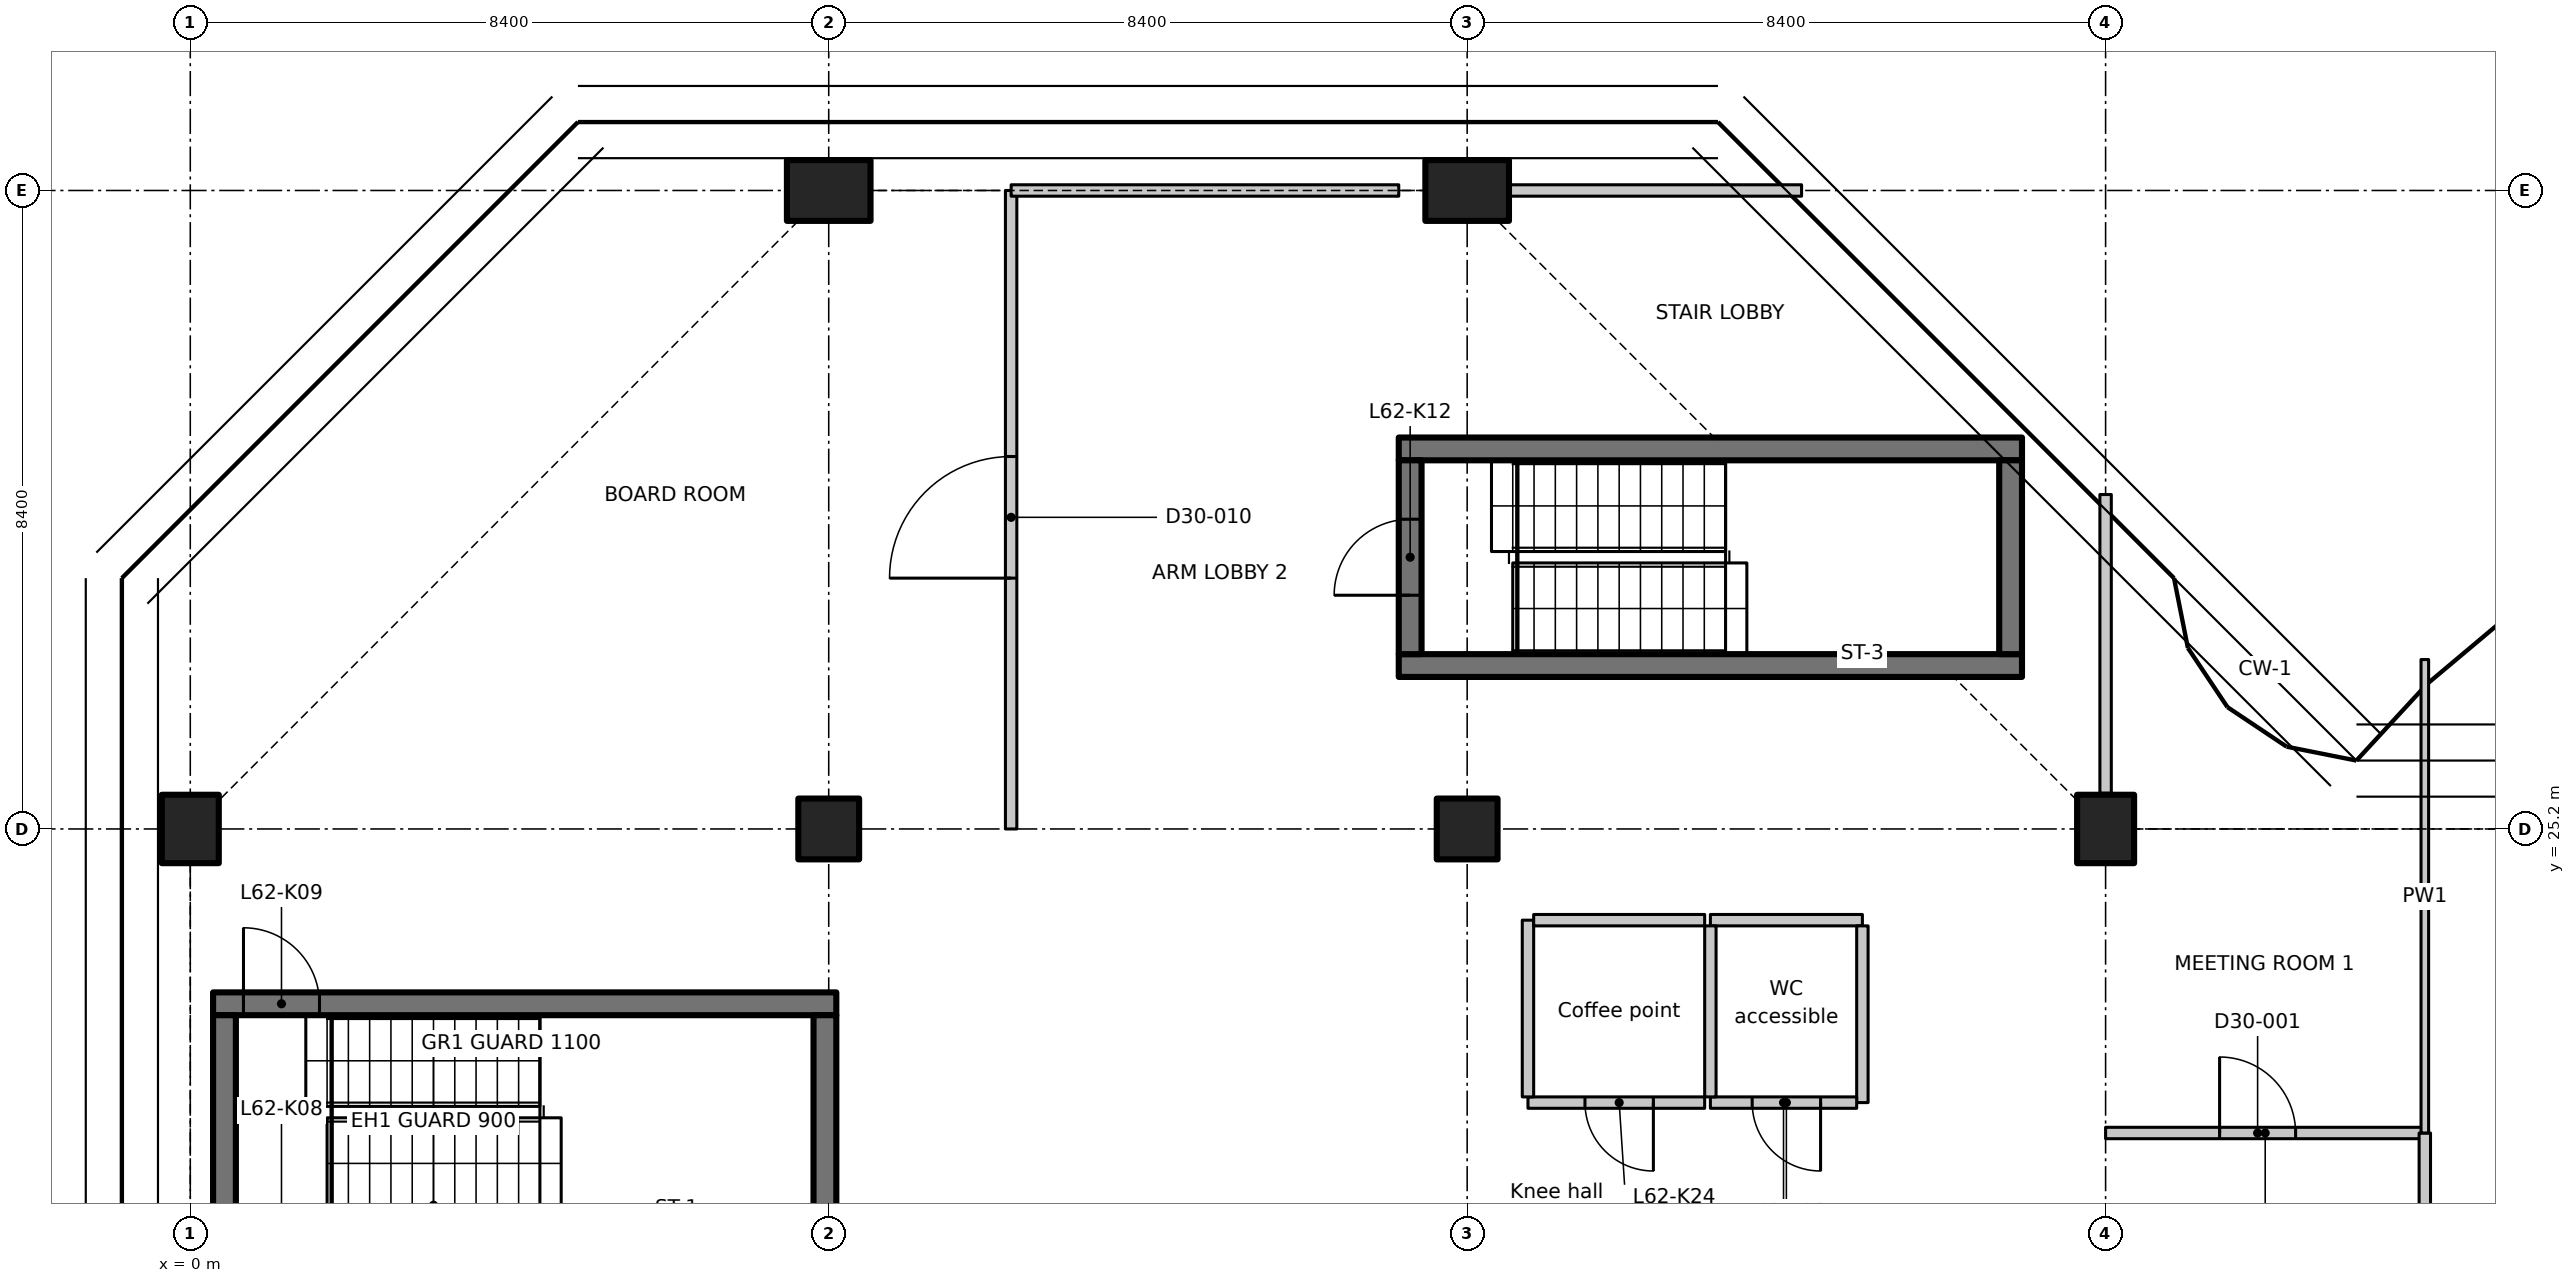
"""IFC4 building model, lengths in metres.
Left out: names, types, materials, properties, quantities, classifications, styles, units other than length and angle.
Written with IfcOpenShell. Run it as: python <this file> out.ifc"""

import sys

from ifc_helpers import new_model, si_unit, direction, frame, frame_2d, origin, origin_2d, place, context, subcontext, project, spatial, polyline, rectangle, outline, extrude, element, fill, save


model = new_model("IFC4")
c1 = context("Model", 3, precision=1e-05, world=origin(), true_north=direction((0.0, 1.0)))
c2 = subcontext(c1, "Body", "Model", "MODEL_VIEW")
j1 = project(units=[si_unit("LENGTHUNIT", "METRE"), si_unit("PLANEANGLEUNIT", "RADIAN")], contexts=[c1])
p1 = place(None, origin())
s1 = spatial("IfcSite", under=j1, at=p1, CompositionType="ELEMENT")
p2 = place(p1, origin())
s2 = spatial("IfcBuilding", under=s1, at=p2, CompositionType="ELEMENT")
p3 = place(p2, frame((0.0, 0.0, 244.5)))
s3 = spatial("IfcBuildingStorey", under=s2, at=p3, CompositionType="ELEMENT", Elevation=244.5)
p4 = place(p3, frame((0.0, 25.2, 0.0), z_axis=(0.0, 0.0, 1.0), x_axis=(1.0, 0.0, 0.0)))
e1 = element("IfcColumn", 1, at=p4, inside=s3, PredefinedType="COLUMN", context=c2, shape_type="SweptSolid", body=[
    extrude(rectangle(XDim=0.75, YDim=0.9, at=origin_2d()), origin(), (0.0, 0.0, 1.0), 3.35),
])
p5 = place(p3, frame((8.4, 25.2, 0.0), z_axis=(0.0, 0.0, 1.0), x_axis=(1.0, 0.0, 0.0)))
e2 = element("IfcColumn", 2, at=p5, inside=s3, PredefinedType="COLUMN", context=c2, shape_type="SweptSolid", body=[
    extrude(rectangle(XDim=0.8, YDim=0.8, at=origin_2d()), origin(), (0.0, 0.0, 1.0), 3.35),
])
p6 = place(p3, frame((8.4, 33.6, 0.0), z_axis=(0.0, 0.0, 1.0), x_axis=(0.0, 1.0, 0.0)))
e3 = element("IfcColumn", 3, at=p6, inside=s3, PredefinedType="COLUMN", context=c2, shape_type="SweptSolid", body=[
    extrude(rectangle(XDim=0.8, YDim=1.1, at=origin_2d()), origin(), (0.0, 0.0, 1.0), 3.35),
])
p7 = place(p3, frame((16.8, 25.2, 0.0), z_axis=(0.0, 0.0, 1.0), x_axis=(1.0, 0.0, 0.0)))
e4 = element("IfcColumn", 4, at=p7, inside=s3, PredefinedType="COLUMN", context=c2, shape_type="SweptSolid", body=[
    extrude(rectangle(XDim=0.8, YDim=0.8, at=origin_2d()), origin(), (0.0, 0.0, 1.0), 3.35),
])
p8 = place(p3, frame((16.8, 33.6, 0.0), z_axis=(0.0, 0.0, 1.0), x_axis=(0.0, 1.0, 0.0)))
e5 = element("IfcColumn", 5, at=p8, inside=s3, PredefinedType="COLUMN", context=c2, shape_type="SweptSolid", body=[
    extrude(rectangle(XDim=0.8, YDim=1.1, at=origin_2d()), origin(), (0.0, 0.0, 1.0), 3.35),
])
p9 = place(p3, frame((25.2, 25.2, 0.0), z_axis=(0.0, 0.0, 1.0), x_axis=(1.0, 0.0, 0.0)))
e6 = element("IfcColumn", 6, at=p9, inside=s3, PredefinedType="COLUMN", context=c2, shape_type="SweptSolid", body=[
    extrude(rectangle(XDim=0.75, YDim=0.9, at=origin_2d()), origin(), (0.0, 0.0, 1.0), 3.35),
])
p10 = place(p3, frame((0.3, 22.9, 0.0), z_axis=(0.0, 0.0, 1.0), x_axis=(1.0, 0.0, 0.0)))
e7 = element("IfcWall", 7, at=p10, inside=s3, PredefinedType="SHEAR", context=c2, shape_type="SweptSolid", body=[
    extrude(rectangle(XDim=8.2, YDim=0.3, at=frame_2d((4.1, 0.0))), origin(), (0.0, 0.0, 1.0), 3.35),
])
p11 = place(p10, frame((0.4, 0.0, 0.0)))
e8 = element("IfcOpeningElement", 8, at=p11, cuts=e7, PredefinedType="OPENING", context=c2, shape_type="SweptSolid", body=[
    extrude(rectangle(XDim=1.0, YDim=2.1, at=frame_2d((0.5, 1.05))), frame((0.0, 0.16, 0.0), z_axis=(0.0, -1.0, 0.0), x_axis=(1.0, 0.0, 0.0)), (0.0, 0.0, 1.0), 0.32),
])
for number, where, z_axis, x_axis in (
    (9, (0.45, 20.2, 0.0), (0.0, 0.0, 1.0), (0.0, 1.0, 0.0)),
    (10, (8.35, 20.2, 0.0), (0.0, 0.0, 1.0), (0.0, 1.0, 0.0)),
):
    element("IfcWall", number, at=place(p3, frame(where, z_axis=z_axis, x_axis=x_axis)), inside=s3, PredefinedType="SHEAR", context=c2, shape_type="SweptSolid", body=[
        extrude(rectangle(XDim=2.55, YDim=0.3, at=frame_2d((1.275, 0.0))), origin(), (0.0, 0.0, 1.0), 3.35),
    ])
for number, where, z_axis, x_axis in (
    (11, (15.9, 27.35, 0.0), (0.0, 0.0, 1.0), (1.0, 0.0, 0.0)),
    (12, (15.9, 30.2, 0.0), (0.0, 0.0, 1.0), (1.0, 0.0, 0.0)),
):
    element("IfcWall", number, at=place(p3, frame(where, z_axis=z_axis, x_axis=x_axis)), inside=s3, PredefinedType="SHEAR", context=c2, shape_type="SweptSolid", body=[
        extrude(rectangle(XDim=8.2, YDim=0.3, at=frame_2d((4.1, 0.0))), origin(), (0.0, 0.0, 1.0), 3.35),
    ])
p12 = place(p3, frame((16.05, 27.5, 0.0), z_axis=(0.0, 0.0, 1.0), x_axis=(0.0, 1.0, 0.0)))
e13 = element("IfcWall", 13, at=p12, inside=s3, PredefinedType="SHEAR", context=c2, shape_type="SweptSolid", body=[
    extrude(rectangle(XDim=2.55, YDim=0.3, at=frame_2d((1.275, 0.0))), origin(), (0.0, 0.0, 1.0), 3.35),
])
p13 = place(p12, frame((0.775, 0.0, 0.0)))
e14 = element("IfcOpeningElement", 14, at=p13, cuts=e13, PredefinedType="OPENING", context=c2, shape_type="SweptSolid", body=[
    extrude(rectangle(XDim=1.0, YDim=2.1, at=frame_2d((0.5, 1.05))), frame((0.0, 0.16, 0.0), z_axis=(0.0, -1.0, 0.0), x_axis=(1.0, 0.0, 0.0)), (0.0, 0.0, 1.0), 0.32),
])
p14 = place(p3, frame((23.95, 27.5, 0.0), z_axis=(0.0, 0.0, 1.0), x_axis=(0.0, 1.0, 0.0)))
e15 = element("IfcWall", 15, at=p14, inside=s3, PredefinedType="SHEAR", context=c2, shape_type="SweptSolid", body=[
    extrude(rectangle(XDim=2.55, YDim=0.3, at=frame_2d((1.275, 0.0))), origin(), (0.0, 0.0, 1.0), 3.35),
])
p15 = place(p3, frame((20.0, 24.0, 0.0), z_axis=(0.0, 0.0, 1.0), x_axis=(1.0, 0.0, 0.0)))
e16 = element("IfcWall", 16, at=p15, inside=s3, PredefinedType="PARTITIONING", context=c2, shape_type="SweptSolid", body=[
    extrude(rectangle(XDim=2.0, YDim=0.15, at=frame_2d((1.0, 0.0))), origin(), (0.0, 0.0, 1.0), 3.35),
])
p16 = place(p3, frame((22.0, 23.925, 0.0), z_axis=(0.0, 0.0, 1.0), x_axis=(0.0, -1.0, 0.0)))
e17 = element("IfcWall", 17, at=p16, inside=s3, PredefinedType="PARTITIONING", context=c2, shape_type="SweptSolid", body=[
    extrude(rectangle(XDim=2.325, YDim=0.15, at=frame_2d((1.163, 0.0))), origin(), (0.0, 0.0, 1.0), 3.35),
])
p17 = place(p3, frame((21.925, 21.6, 0.0), z_axis=(0.0, 0.0, 1.0), x_axis=(-1.0, 0.0, 0.0)))
e18 = element("IfcWall", 18, at=p17, inside=s3, PredefinedType="PARTITIONING", context=c2, shape_type="SweptSolid", body=[
    extrude(rectangle(XDim=1.925, YDim=0.15, at=frame_2d((0.962, 0.0))), origin(), (0.0, 0.0, 1.0), 3.35),
])
p18 = place(p17, frame((0.475, 0.0, 0.0)))
e19 = element("IfcOpeningElement", 19, at=p18, cuts=e18, PredefinedType="OPENING", context=c2, shape_type="SweptSolid", body=[
    extrude(rectangle(XDim=0.9, YDim=2.1, at=frame_2d((0.45, 1.05))), frame((0.0, 0.085, 0.0), z_axis=(0.0, -1.0, 0.0), x_axis=(1.0, 0.0, 0.0)), (0.0, 0.0, 1.0), 0.17),
])
p19 = place(p3, frame((20.0, 21.675, 0.0), z_axis=(0.0, 0.0, 1.0), x_axis=(0.0, 1.0, 0.0)))
e20 = element("IfcWall", 20, at=p19, inside=s3, PredefinedType="PARTITIONING", context=c2, shape_type="SweptSolid", body=[
    extrude(rectangle(XDim=2.25, YDim=0.15, at=frame_2d((1.125, 0.0))), origin(), (0.0, 0.0, 1.0), 3.35),
])
p20 = place(p3, frame((19.925, 21.6, 0.0), z_axis=(0.0, 0.0, 1.0), x_axis=(-1.0, 0.0, 0.0)))
e21 = element("IfcWall", 21, at=p20, inside=s3, PredefinedType="PARTITIONING", context=c2, shape_type="SweptSolid", body=[
    extrude(rectangle(XDim=2.325, YDim=0.15, at=frame_2d((1.163, 0.0))), origin(), (0.0, 0.0, 1.0), 3.35),
])
p21 = place(p20, frame((0.675, 0.0, 0.0)))
e22 = element("IfcOpeningElement", 22, at=p21, cuts=e21, PredefinedType="OPENING", context=c2, shape_type="SweptSolid", body=[
    extrude(rectangle(XDim=0.9, YDim=2.1, at=frame_2d((0.45, 1.05))), frame((0.0, 0.085, 0.0), z_axis=(0.0, -1.0, 0.0), x_axis=(1.0, 0.0, 0.0)), (0.0, 0.0, 1.0), 0.17),
])
p22 = place(p3, frame((17.6, 21.675, 0.0), z_axis=(0.0, 0.0, 1.0), x_axis=(0.0, 1.0, 0.0)))
e23 = element("IfcWall", 23, at=p22, inside=s3, PredefinedType="PARTITIONING", context=c2, shape_type="SweptSolid", body=[
    extrude(rectangle(XDim=2.325, YDim=0.15, at=frame_2d((1.163, 0.0))), origin(), (0.0, 0.0, 1.0), 3.35),
])
p23 = place(p3, frame((17.675, 24.0, 0.0), z_axis=(0.0, 0.0, 1.0), x_axis=(1.0, 0.0, 0.0)))
e24 = element("IfcWall", 24, at=p23, inside=s3, PredefinedType="PARTITIONING", context=c2, shape_type="SweptSolid", body=[
    extrude(rectangle(XDim=2.25, YDim=0.15, at=frame_2d((1.125, 0.0))), origin(), (0.0, 0.0, 1.0), 3.35),
])
p24 = place(p3, frame((25.2, 21.2, 0.0), z_axis=(0.0, 0.0, 1.0), x_axis=(1.0, 0.0, 0.0)))
e25 = element("IfcWall", 25, at=p24, inside=s3, PredefinedType="PARTITIONING", context=c2, shape_type="SweptSolid", body=[
    extrude(rectangle(XDim=4.2, YDim=0.15, at=frame_2d((2.1, 0.0))), origin(), (0.0, 0.0, 1.0), 3.33),
])
p25 = place(p24, frame((1.5, 0.0, 0.0)))
e26 = element("IfcOpeningElement", 26, at=p25, cuts=e25, PredefinedType="OPENING", context=c2, shape_type="SweptSolid", body=[
    extrude(rectangle(XDim=1.0, YDim=2.1, at=frame_2d((0.5, 1.05))), frame((0.0, 0.085, 0.0), z_axis=(0.0, -1.0, 0.0), x_axis=(1.0, 0.0, 0.0)), (0.0, 0.0, 1.0), 0.17),
])
p26 = place(p3, frame((29.4, 21.2, 0.0), z_axis=(0.0, 0.0, 1.0), x_axis=(0.0, -1.0, 0.0)))
e27 = element("IfcWall", 27, at=p26, inside=s3, PredefinedType="PARTITIONING", context=c2, shape_type="SweptSolid", body=[
    extrude(rectangle(XDim=8.2, YDim=0.15, at=frame_2d((4.1, 0.0))), origin(), (0.0, 0.0, 1.0), 3.33),
])
p27 = place(p26, frame((3.3, 0.0, 0.0)))
e28 = element("IfcOpeningElement", 28, at=p27, cuts=e27, PredefinedType="OPENING", context=c2, shape_type="SweptSolid", body=[
    extrude(rectangle(XDim=1.6, YDim=2.1, at=frame_2d((0.8, 1.05))), frame((0.0, 0.085, 0.0), z_axis=(0.0, -1.0, 0.0), x_axis=(1.0, 0.0, 0.0)), (0.0, 0.0, 1.0), 0.17),
])
p28 = place(p3, frame((29.4, 27.429, 0.0), z_axis=(0.0, 0.0, 1.0), x_axis=(0.0, -1.0, 0.0)))
e29 = element("IfcWall", 29, at=p28, inside=s3, PredefinedType="PARTITIONING", context=c2, shape_type="SweptSolid", body=[
    extrude(outline(polyline([(0.0, 0.0), (6.229, 0.0), (6.229, 3.33), (2.679, 3.33), (2.677, 2.98), (1.781, 2.98), (1.779, 3.33), (0.154, 3.33), (0.0, 3.33), (0.0, 0.0)])), frame((0.0, 0.05, 0.0), z_axis=(0.0, -1.0, 0.0), x_axis=(1.0, 0.0, 0.0)), (0.0, 0.0, 1.0), 0.1),
])
p29 = place(p3, frame((25.2, 25.67, 0.0), z_axis=(0.0, 0.0, 1.0), x_axis=(0.0, 1.0, 0.0)))
e30 = element("IfcWall", 30, at=p29, inside=s3, PredefinedType="PARTITIONING", context=c2, shape_type="SweptSolid", body=[
    extrude(rectangle(XDim=3.93, YDim=0.15, at=frame_2d((1.965, 0.0))), origin(), (0.0, 0.0, 1.0), 2.98),
])
p30 = place(p3, frame((10.8, 25.2, 0.0), z_axis=(0.0, 0.0, 1.0), x_axis=(0.0, 1.0, 0.0)))
e31 = element("IfcWall", 31, at=p30, inside=s3, PredefinedType="PARTITIONING", context=c2, shape_type="SweptSolid", body=[
    extrude(outline(polyline([(0.0, 0.0), (8.4, 0.0), (8.4, 2.98), (7.952, 2.98), (7.95, 3.33), (0.0, 3.33), (0.0, 0.0)])), frame((0.0, 0.075, 0.0), z_axis=(0.0, -1.0, 0.0), x_axis=(1.0, 0.0, 0.0)), (0.0, 0.0, 1.0), 0.15),
])
p31 = place(p30, frame((3.3, 0.0, 0.0)))
e32 = element("IfcOpeningElement", 32, at=p31, cuts=e31, PredefinedType="OPENING", context=c2, shape_type="SweptSolid", body=[
    extrude(rectangle(XDim=1.6, YDim=2.1, at=frame_2d((0.8, 1.05))), frame((0.0, 0.085, 0.0), z_axis=(0.0, -1.0, 0.0), x_axis=(1.0, 0.0, 0.0)), (0.0, 0.0, 1.0), 0.17),
])
p32 = place(p3, frame((10.8, 33.6, 0.0), z_axis=(0.0, 0.0, 1.0), x_axis=(1.0, 0.0, 0.0)))
e33 = element("IfcWall", 33, at=p32, inside=s3, PredefinedType="PARTITIONING", context=c2, shape_type="SweptSolid", body=[
    extrude(outline(polyline([(0.0, 0.0), (5.1, 0.0), (5.1, 2.98), (0.0, 2.98), (0.0, 0.0)])), frame((0.0, 0.075, 0.0), z_axis=(0.0, -1.0, 0.0), x_axis=(1.0, 0.0, 0.0)), (0.0, 0.0, 1.0), 0.15),
])
p33 = place(p3, frame((17.37, 33.6, 0.0), z_axis=(0.0, 0.0, 1.0), x_axis=(1.0, 0.0, 0.0)))
e34 = element("IfcWall", 34, at=p33, inside=s3, PredefinedType="PARTITIONING", context=c2, shape_type="SweptSolid", body=[
    extrude(rectangle(XDim=3.83, YDim=0.15, at=frame_2d((1.915, 0.0))), origin(), (0.0, 0.0, 1.0), 2.98),
])
p34 = place(p11, origin())
e35 = element("IfcDoor", 35, at=p34, inside=s3, OperationType="SINGLE_SWING_LEFT", PredefinedType="DOOR", context=c2, shape_type="SweptSolid", body=[
    extrude(rectangle(XDim=1.0, YDim=2.1, at=frame_2d((0.5, 1.05))), frame((0.0, 0.025, 0.0), z_axis=(0.0, -1.0, 0.0), x_axis=(1.0, 0.0, 0.0)), (0.0, 0.0, 1.0), 0.05),
])
fill(e8, e35)
p35 = place(p13, origin())
e36 = element("IfcDoor", 36, at=p35, inside=s3, OperationType="SINGLE_SWING_RIGHT", PredefinedType="DOOR", context=c2, shape_type="SweptSolid", body=[
    extrude(rectangle(XDim=1.0, YDim=2.1, at=frame_2d((0.5, 1.05))), frame((0.0, 0.025, 0.0), z_axis=(0.0, -1.0, 0.0), x_axis=(1.0, 0.0, 0.0)), (0.0, 0.0, 1.0), 0.05),
])
fill(e14, e36)
p36 = place(p18, origin())
e37 = element("IfcDoor", 37, at=p36, inside=s3, OperationType="SINGLE_SWING_LEFT", PredefinedType="DOOR", context=c2, shape_type="SweptSolid", body=[
    extrude(rectangle(XDim=0.9, YDim=2.1, at=frame_2d((0.45, 1.05))), frame((0.0, 0.025, 0.0), z_axis=(0.0, -1.0, 0.0), x_axis=(1.0, 0.0, 0.0)), (0.0, 0.0, 1.0), 0.05),
])
fill(e19, e37)
p37 = place(p21, origin())
e38 = element("IfcDoor", 38, at=p37, inside=s3, OperationType="SINGLE_SWING_RIGHT", PredefinedType="DOOR", context=c2, shape_type="SweptSolid", body=[
    extrude(rectangle(XDim=0.9, YDim=2.1, at=frame_2d((0.45, 1.05))), frame((0.0, 0.025, 0.0), z_axis=(0.0, -1.0, 0.0), x_axis=(1.0, 0.0, 0.0)), (0.0, 0.0, 1.0), 0.05),
])
fill(e22, e38)
p38 = place(p25, origin())
e39 = element("IfcDoor", 39, at=p38, inside=s3, OperationType="SINGLE_SWING_LEFT", PredefinedType="DOOR", context=c2, shape_type="SweptSolid", body=[
    extrude(rectangle(XDim=1.0, YDim=2.1, at=frame_2d((0.5, 1.05))), frame((0.0, 0.025, 0.0), z_axis=(0.0, -1.0, 0.0), x_axis=(1.0, 0.0, 0.0)), (0.0, 0.0, 1.0), 0.05),
])
fill(e26, e39)
p39 = place(p31, origin())
e40 = element("IfcDoor", 40, at=p39, inside=s3, OperationType="DOUBLE_DOOR_SINGLE_SWING", PredefinedType="DOOR", context=c2, shape_type="SweptSolid", body=[
    extrude(rectangle(XDim=1.6, YDim=2.1, at=frame_2d((0.8, 1.05))), frame((0.0, 0.025, 0.0), z_axis=(0.0, -1.0, 0.0), x_axis=(1.0, 0.0, 0.0)), (0.0, 0.0, 1.0), 0.05),
])
fill(e32, e40)
save(model, sys.argv[1])
